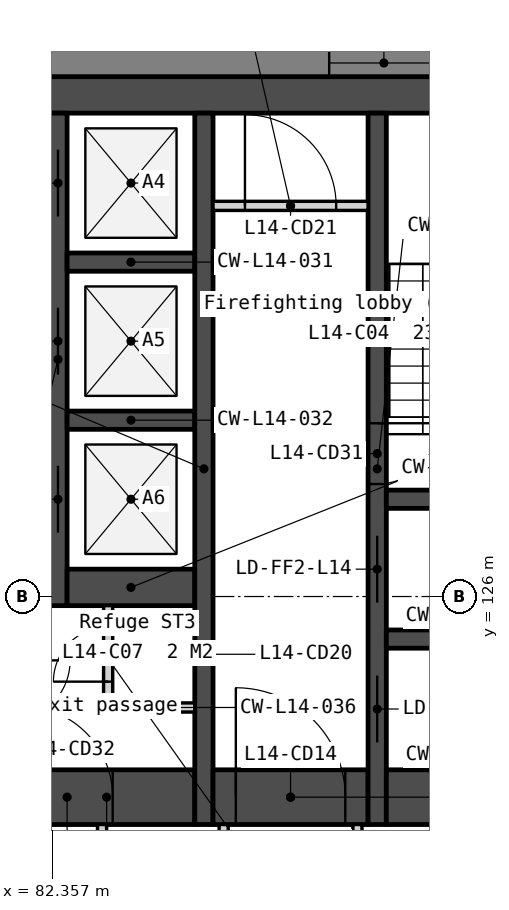
"""IFC4 building model, lengths in metres.
Left out: names, types, materials, properties, quantities, classifications, styles, units other than length and angle.
Written with IfcOpenShell. Run it as: python <this file> out.ifc"""

import sys

from ifc_helpers import new_model, si_unit, direction, frame, frame_2d, origin, place, context, subcontext, project, spatial, polyline, rectangle, outline, extrude, element, fill, save


model = new_model("IFC4")
c1 = context("Model", 3, precision=1e-05, world=origin(), true_north=direction((0.0, 1.0)))
c2 = subcontext(c1, "Body", "Model", "MODEL_VIEW")
j1 = project(units=[si_unit("LENGTHUNIT", "METRE"), si_unit("PLANEANGLEUNIT", "RADIAN")], contexts=[c1])
p1 = place(None, origin())
s1 = spatial("IfcSite", under=j1, at=p1, CompositionType="ELEMENT")
p2 = place(p1, origin())
s2 = spatial("IfcBuilding", under=s1, at=p2, CompositionType="ELEMENT")
p3 = place(p2, frame((0.0, 0.0, 63.0)))
s3 = spatial("IfcBuildingStorey", under=s2, at=p3, CompositionType="ELEMENT", Elevation=63.0)
p4 = place(p3, frame((66.0, 134.25, 0.0), z_axis=(0.0, 0.0, 1.0), x_axis=(1.0, 0.0, 0.0)))
e1 = element("IfcWall", 1, at=p4, inside=s3, PredefinedType="SOLIDWALL", context=c2, shape_type="SweptSolid", body=[
    extrude(rectangle(XDim=28.0, YDim=0.6, at=frame_2d((14.0, 0.0))), origin(), (0.0, 0.0, 1.0), 3.35),
])
p5 = place(p3, frame((81.8, 122.7, 0.0), z_axis=(0.0, 0.0, 1.0), x_axis=(1.0, 0.0, 0.0)))
e2 = element("IfcWall", 2, at=p5, inside=s3, PredefinedType="SOLIDWALL", context=c2, shape_type="SweptSolid", body=[
    extrude(rectangle(XDim=2.9, YDim=0.9, at=frame_2d((1.45, 0.0))), origin(), (0.0, 0.0, 1.0), 3.35),
])
p6 = place(p5, frame((0.05, 0.0, 0.0)))
e3 = element("IfcOpeningElement", 3, at=p6, cuts=e2, PredefinedType="OPENING", context=c2, shape_type="SweptSolid", body=[
    extrude(rectangle(XDim=1.5, YDim=2.1, at=frame_2d((0.75, 1.05))), frame((0.0, 0.46, 0.0), z_axis=(0.0, -1.0, 0.0), x_axis=(1.0, 0.0, 0.0)), (0.0, 0.0, 1.0), 0.92),
])
p7 = place(p3, frame((82.45, 133.95, 0.0), z_axis=(0.0, 0.0, 1.0), x_axis=(0.0, -1.0, 0.0)))
e4 = element("IfcWall", 4, at=p7, inside=s3, PredefinedType="SOLIDWALL", context=c2, shape_type="SweptSolid", body=[
    extrude(rectangle(XDim=8.1, YDim=0.3, at=frame_2d((4.05, 0.0))), origin(), (0.0, 0.0, 1.0), 3.35),
])
p8 = place(p7, frame((0.6, 0.0, 0.0)))
e5 = element("IfcOpeningElement", 5, at=p8, cuts=e4, PredefinedType="OPENING", context=c2, shape_type="SweptSolid", body=[
    extrude(rectangle(XDim=1.1, YDim=2.1, at=frame_2d((0.55, 1.05))), frame((0.0, 0.16, 0.0), z_axis=(0.0, -1.0, 0.0), x_axis=(1.0, 0.0, 0.0)), (0.0, 0.0, 1.0), 0.32),
])
p9 = place(p7, frame((3.2, 0.0, 0.0)))
e6 = element("IfcOpeningElement", 6, at=p9, cuts=e4, PredefinedType="OPENING", context=c2, shape_type="SweptSolid", body=[
    extrude(rectangle(XDim=1.1, YDim=2.1, at=frame_2d((0.55, 1.05))), frame((0.0, 0.16, 0.0), z_axis=(0.0, -1.0, 0.0), x_axis=(1.0, 0.0, 0.0)), (0.0, 0.0, 1.0), 0.32),
])
p10 = place(p7, frame((5.8, 0.0, 0.0)))
e7 = element("IfcOpeningElement", 7, at=p10, cuts=e4, PredefinedType="OPENING", context=c2, shape_type="SweptSolid", body=[
    extrude(rectangle(XDim=1.1, YDim=2.1, at=frame_2d((0.55, 1.05))), frame((0.0, 0.16, 0.0), z_axis=(0.0, -1.0, 0.0), x_axis=(1.0, 0.0, 0.0)), (0.0, 0.0, 1.0), 0.32),
])
for number, where, z_axis, x_axis in (
    (8, (82.6, 131.5, 0.0), (0.0, 0.0, 1.0), (1.0, 0.0, 0.0)),
    (9, (82.6, 128.9, 0.0), (0.0, 0.0, 1.0), (1.0, 0.0, 0.0)),
):
    element("IfcWall", number, at=place(p3, frame(where, z_axis=z_axis, x_axis=x_axis)), inside=s3, PredefinedType="SOLIDWALL", context=c2, shape_type="SweptSolid", body=[
        extrude(rectangle(XDim=2.1, YDim=0.3, at=frame_2d((1.05, 0.0))), origin(), (0.0, 0.0, 1.0), 3.35),
    ])
p11 = place(p3, frame((82.6, 126.15, 0.0), z_axis=(0.0, 0.0, 1.0), x_axis=(1.0, 0.0, 0.0)))
e10 = element("IfcWall", 10, at=p11, inside=s3, PredefinedType="SOLIDWALL", context=c2, shape_type="SweptSolid", body=[
    extrude(rectangle(XDim=2.1, YDim=0.6, at=frame_2d((1.05, 0.0))), origin(), (0.0, 0.0, 1.0), 3.35),
])
p12 = place(p3, frame((83.175, 122.25, 0.0), z_axis=(0.0, 0.0, 1.0), x_axis=(0.0, -1.0, 0.0)))
e11 = element("IfcWall", 11, at=p12, inside=s3, PredefinedType="PARTITIONING", context=c2, shape_type="SweptSolid", body=[
    extrude(rectangle(XDim=2.1, YDim=0.15, at=frame_2d((1.05, 0.0))), origin(), (0.0, 0.0, 1.0), 3.35),
])
p13 = place(p3, frame((83.275, 125.85, 0.0), z_axis=(0.0, 0.0, 1.0), x_axis=(0.0, -1.0, 0.0)))
e12 = element("IfcWall", 12, at=p13, inside=s3, PredefinedType="PARTITIONING", context=c2, shape_type="SweptSolid", body=[
    extrude(rectangle(XDim=1.75, YDim=0.15, at=frame_2d((0.875, 0.0))), origin(), (0.0, 0.0, 1.0), 3.35),
])
p14 = place(p13, frame((0.35, 0.0, 0.0)))
e13 = element("IfcOpeningElement", 13, at=p14, cuts=e12, PredefinedType="OPENING", context=c2, shape_type="SweptSolid", body=[
    extrude(rectangle(XDim=0.9, YDim=2.1, at=frame_2d((0.45, 1.05))), frame((0.0, 0.085, 0.0), z_axis=(0.0, -1.0, 0.0), x_axis=(1.0, 0.0, 0.0)), (0.0, 0.0, 1.0), 0.17),
])
p15 = place(p3, frame((83.35, 124.175, 0.0), z_axis=(0.0, 0.0, 1.0), x_axis=(1.0, 0.0, 0.0)))
e14 = element("IfcWall", 14, at=p15, inside=s3, PredefinedType="PARTITIONING", context=c2, shape_type="SweptSolid", body=[
    extrude(rectangle(XDim=1.35, YDim=0.15, at=frame_2d((0.675, 0.0))), origin(), (0.0, 0.0, 1.0), 3.35),
])
p16 = place(p3, frame((84.85, 133.95, 0.0), z_axis=(0.0, 0.0, 1.0), x_axis=(0.0, -1.0, 0.0)))
e15 = element("IfcWall", 15, at=p16, inside=s3, PredefinedType="SOLIDWALL", context=c2, shape_type="SweptSolid", body=[
    extrude(rectangle(XDim=11.7, YDim=0.3, at=frame_2d((5.85, 0.0))), origin(), (0.0, 0.0, 1.0), 3.35),
])
p17 = place(p3, frame((85.0, 132.425, 0.0), z_axis=(0.0, 0.0, 1.0), x_axis=(1.0, 0.0, 0.0)))
e16 = element("IfcWall", 16, at=p17, inside=s3, PredefinedType="PARTITIONING", context=c2, shape_type="SweptSolid", body=[
    extrude(rectangle(XDim=2.55, YDim=0.15, at=frame_2d((1.275, 0.0))), origin(), (0.0, 0.0, 1.0), 3.35),
])
p18 = place(p17, frame((0.525, 0.0, 0.0)))
e17 = element("IfcOpeningElement", 17, at=p18, cuts=e16, PredefinedType="OPENING", context=c2, shape_type="SweptSolid", body=[
    extrude(rectangle(XDim=1.5, YDim=2.1, at=frame_2d((0.75, 1.05))), frame((0.0, 0.085, 0.0), z_axis=(0.0, -1.0, 0.0), x_axis=(1.0, 0.0, 0.0)), (0.0, 0.0, 1.0), 0.17),
])
p19 = place(p3, frame((85.0, 122.7, 0.0), z_axis=(0.0, 0.0, 1.0), x_axis=(1.0, 0.0, 0.0)))
e18 = element("IfcWall", 18, at=p19, inside=s3, PredefinedType="SOLIDWALL", context=c2, shape_type="SweptSolid", body=[
    extrude(rectangle(XDim=2.55, YDim=0.9, at=frame_2d((1.275, 0.0))), origin(), (0.0, 0.0, 1.0), 3.35),
])
p20 = place(p19, frame((0.375, 0.0, 0.0)))
e19 = element("IfcOpeningElement", 19, at=p20, cuts=e18, PredefinedType="OPENING", context=c2, shape_type="SweptSolid", body=[
    extrude(rectangle(XDim=1.8, YDim=2.1, at=frame_2d((0.9, 1.05))), frame((0.0, 0.46, 0.0), z_axis=(0.0, -1.0, 0.0), x_axis=(1.0, 0.0, 0.0)), (0.0, 0.0, 1.0), 0.92),
])
p21 = place(p3, frame((85.175, 122.25, 0.0), z_axis=(0.0, 0.0, 1.0), x_axis=(0.0, -1.0, 0.0)))
e20 = element("IfcWall", 20, at=p21, inside=s3, PredefinedType="PARTITIONING", context=c2, shape_type="SweptSolid", body=[
    extrude(rectangle(XDim=2.1, YDim=0.15, at=frame_2d((1.05, 0.0))), origin(), (0.0, 0.0, 1.0), 3.35),
])
p22 = place(p21, frame((0.55, 0.0, 0.0)))
e21 = element("IfcOpeningElement", 21, at=p22, cuts=e20, PredefinedType="OPENING", context=c2, shape_type="SweptSolid", body=[
    extrude(rectangle(XDim=1.0, YDim=2.1, at=frame_2d((0.5, 1.05))), frame((0.0, 0.085, 0.0), z_axis=(0.0, -1.0, 0.0), x_axis=(1.0, 0.0, 0.0)), (0.0, 0.0, 1.0), 0.17),
])
p23 = place(p3, frame((87.375, 122.25, 0.0), z_axis=(0.0, 0.0, 1.0), x_axis=(0.0, -1.0, 0.0)))
e22 = element("IfcWall", 22, at=p23, inside=s3, PredefinedType="PARTITIONING", context=c2, shape_type="SweptSolid", body=[
    extrude(rectangle(XDim=2.1, YDim=0.15, at=frame_2d((1.05, 0.0))), origin(), (0.0, 0.0, 1.0), 3.35),
])
p24 = place(p3, frame((87.7, 133.95, 0.0), z_axis=(0.0, 0.0, 1.0), x_axis=(0.0, -1.0, 0.0)))
e23 = element("IfcWall", 23, at=p24, inside=s3, PredefinedType="SOLIDWALL", context=c2, shape_type="SweptSolid", body=[
    extrude(rectangle(XDim=11.7, YDim=0.3, at=frame_2d((5.85, 0.0))), origin(), (0.0, 0.0, 1.0), 3.35),
])
p25 = place(p24, frame((6.95, 0.0, 0.0)))
e24 = element("IfcOpeningElement", 24, at=p25, cuts=e23, PredefinedType="OPENING", context=c2, shape_type="SweptSolid", body=[
    extrude(rectangle(XDim=1.1, YDim=2.1, at=frame_2d((0.55, 1.05))), frame((0.0, 0.16, 0.0), z_axis=(0.0, -1.0, 0.0), x_axis=(1.0, 0.0, 0.0)), (0.0, 0.0, 1.0), 0.32),
])
p26 = place(p24, frame((5.1, 0.0, 0.0)))
e25 = element("IfcOpeningElement", 25, at=p26, cuts=e23, PredefinedType="OPENING", context=c2, shape_type="SweptSolid", body=[
    extrude(rectangle(XDim=1.0, YDim=2.1, at=frame_2d((0.5, 1.05))), frame((0.0, 0.16, 0.0), z_axis=(0.0, -1.0, 0.0), x_axis=(1.0, 0.0, 0.0)), (0.0, 0.0, 1.0), 0.32),
])
p27 = place(p24, frame((9.25, 0.0, 0.0)))
e26 = element("IfcOpeningElement", 26, at=p27, cuts=e23, PredefinedType="OPENING", context=c2, shape_type="SweptSolid", body=[
    extrude(rectangle(XDim=1.1, YDim=2.1, at=frame_2d((0.55, 1.05))), frame((0.0, 0.16, 0.0), z_axis=(0.0, -1.0, 0.0), x_axis=(1.0, 0.0, 0.0)), (0.0, 0.0, 1.0), 0.32),
])
for number, where, z_axis, x_axis in (
    (27, (87.85, 127.6, 0.0), (0.0, 0.0, 1.0), (1.0, 0.0, 0.0)),
    (28, (87.85, 125.3, 0.0), (0.0, 0.0, 1.0), (1.0, 0.0, 0.0)),
):
    element("IfcWall", number, at=place(p3, frame(where, z_axis=z_axis, x_axis=x_axis)), inside=s3, PredefinedType="SOLIDWALL", context=c2, shape_type="SweptSolid", body=[
        extrude(rectangle(XDim=2.55, YDim=0.3, at=frame_2d((1.275, 0.0))), origin(), (0.0, 0.0, 1.0), 3.35),
    ])
p28 = place(p3, frame((87.85, 122.7, 0.0), z_axis=(0.0, 0.0, 1.0), x_axis=(1.0, 0.0, 0.0)))
e29 = element("IfcWall", 29, at=p28, inside=s3, PredefinedType="SOLIDWALL", context=c2, shape_type="SweptSolid", body=[
    extrude(rectangle(XDim=2.55, YDim=0.9, at=frame_2d((1.275, 0.0))), origin(), (0.0, 0.0, 1.0), 3.35),
])
p29 = place(p3, frame((102.4, 134.775, -0.15), z_axis=(0.0, 0.0, 1.0), x_axis=(-1.0, 0.0, 0.0)))
e30 = element("IfcWall", 30, at=p29, inside=s3, PredefinedType="SOLIDWALL", context=c2, shape_type="SweptSolid", body=[
    extrude(outline(polyline([(44.8, 0.0), (44.8, 3.5), (0.0, 3.5), (0.0, 0.0), (44.8, 0.0)])), frame((0.0, 0.225, 0.0), z_axis=(0.0, -1.0, 0.0), x_axis=(1.0, 0.0, 0.0)), (0.0, 0.0, 1.0), 0.45),
])
p30 = place(p29, frame((2.43, 0.0, 1.05)))
e31 = element("IfcOpeningElement", 31, at=p30, cuts=e30, PredefinedType="OPENING", context=c2, shape_type="SweptSolid", body=[
    extrude(rectangle(XDim=1.8, YDim=1.5, at=frame_2d((0.9, 0.75))), frame((0.0, 0.235, 0.0), z_axis=(0.0, -1.0, 0.0), x_axis=(1.0, 0.0, 0.0)), (0.0, 0.0, 1.0), 0.47),
])
p31 = place(p29, frame((4.73, 0.0, 1.05)))
e32 = element("IfcOpeningElement", 32, at=p31, cuts=e30, PredefinedType="OPENING", context=c2, shape_type="SweptSolid", body=[
    extrude(rectangle(XDim=1.8, YDim=1.5, at=frame_2d((0.9, 0.75))), frame((0.0, 0.235, 0.0), z_axis=(0.0, -1.0, 0.0), x_axis=(1.0, 0.0, 0.0)), (0.0, 0.0, 1.0), 0.47),
])
p32 = place(p29, frame((11.39, 0.0, 1.05)))
e33 = element("IfcOpeningElement", 33, at=p32, cuts=e30, PredefinedType="OPENING", context=c2, shape_type="SweptSolid", body=[
    extrude(rectangle(XDim=1.8, YDim=1.5, at=frame_2d((0.9, 0.75))), frame((0.0, 0.235, 0.0), z_axis=(0.0, -1.0, 0.0), x_axis=(1.0, 0.0, 0.0)), (0.0, 0.0, 1.0), 0.47),
])
p33 = place(p29, frame((13.69, 0.0, 1.05)))
e34 = element("IfcOpeningElement", 34, at=p33, cuts=e30, PredefinedType="OPENING", context=c2, shape_type="SweptSolid", body=[
    extrude(rectangle(XDim=1.8, YDim=1.5, at=frame_2d((0.9, 0.75))), frame((0.0, 0.235, 0.0), z_axis=(0.0, -1.0, 0.0), x_axis=(1.0, 0.0, 0.0)), (0.0, 0.0, 1.0), 0.47),
])
p34 = place(p29, frame((20.35, 0.0, 1.05)))
e35 = element("IfcOpeningElement", 35, at=p34, cuts=e30, PredefinedType="OPENING", context=c2, shape_type="SweptSolid", body=[
    extrude(rectangle(XDim=1.8, YDim=1.5, at=frame_2d((0.9, 0.75))), frame((0.0, 0.235, 0.0), z_axis=(0.0, -1.0, 0.0), x_axis=(1.0, 0.0, 0.0)), (0.0, 0.0, 1.0), 0.47),
])
p35 = place(p29, frame((22.65, 0.0, 1.05)))
e36 = element("IfcOpeningElement", 36, at=p35, cuts=e30, PredefinedType="OPENING", context=c2, shape_type="SweptSolid", body=[
    extrude(rectangle(XDim=1.8, YDim=1.5, at=frame_2d((0.9, 0.75))), frame((0.0, 0.235, 0.0), z_axis=(0.0, -1.0, 0.0), x_axis=(1.0, 0.0, 0.0)), (0.0, 0.0, 1.0), 0.47),
])
p36 = place(p29, frame((29.31, 0.0, 1.05)))
e37 = element("IfcOpeningElement", 37, at=p36, cuts=e30, PredefinedType="OPENING", context=c2, shape_type="SweptSolid", body=[
    extrude(rectangle(XDim=1.8, YDim=1.5, at=frame_2d((0.9, 0.75))), frame((0.0, 0.235, 0.0), z_axis=(0.0, -1.0, 0.0), x_axis=(1.0, 0.0, 0.0)), (0.0, 0.0, 1.0), 0.47),
])
p37 = place(p29, frame((31.61, 0.0, 1.05)))
e38 = element("IfcOpeningElement", 38, at=p37, cuts=e30, PredefinedType="OPENING", context=c2, shape_type="SweptSolid", body=[
    extrude(rectangle(XDim=1.8, YDim=1.5, at=frame_2d((0.9, 0.75))), frame((0.0, 0.235, 0.0), z_axis=(0.0, -1.0, 0.0), x_axis=(1.0, 0.0, 0.0)), (0.0, 0.0, 1.0), 0.47),
])
p38 = place(p29, frame((38.27, 0.0, 1.05)))
e39 = element("IfcOpeningElement", 39, at=p38, cuts=e30, PredefinedType="OPENING", context=c2, shape_type="SweptSolid", body=[
    extrude(rectangle(XDim=1.8, YDim=1.5, at=frame_2d((0.9, 0.75))), frame((0.0, 0.235, 0.0), z_axis=(0.0, -1.0, 0.0), x_axis=(1.0, 0.0, 0.0)), (0.0, 0.0, 1.0), 0.47),
])
p39 = place(p29, frame((40.57, 0.0, 1.05)))
e40 = element("IfcOpeningElement", 40, at=p39, cuts=e30, PredefinedType="OPENING", context=c2, shape_type="SweptSolid", body=[
    extrude(rectangle(XDim=1.8, YDim=1.5, at=frame_2d((0.9, 0.75))), frame((0.0, 0.235, 0.0), z_axis=(0.0, -1.0, 0.0), x_axis=(1.0, 0.0, 0.0)), (0.0, 0.0, 1.0), 0.47),
])
p40 = place(p3, frame((83.105, 90.599, -0.15), z_axis=(0.0, 0.0, 1.0), x_axis=(0.499999201451, 0.866025864826, 0.0)))
e41 = element("IfcWall", 41, at=p40, inside=s3, PredefinedType="SOLIDWALL", context=c2, shape_type="SweptSolid", body=[
    extrude(outline(polyline([(44.8, 0.0), (44.8, 3.5), (0.0, 3.5), (0.0, 0.0), (44.8, 0.0)])), frame((0.0, 0.225, 0.0), z_axis=(0.0, -1.0, 0.0), x_axis=(1.0, 0.0, 0.0)), (0.0, 0.0, 1.0), 0.45),
])
p41 = place(p40, frame((2.43, 0.0, 1.05)))
e42 = element("IfcOpeningElement", 42, at=p41, cuts=e41, PredefinedType="OPENING", context=c2, shape_type="SweptSolid", body=[
    extrude(rectangle(XDim=1.8, YDim=1.5, at=frame_2d((0.9, 0.75))), frame((0.0, 0.235, 0.0), z_axis=(0.0, -1.0, 0.0), x_axis=(1.0, 0.0, 0.0)), (0.0, 0.0, 1.0), 0.47),
])
p42 = place(p40, frame((4.73, 0.0, 1.05)))
e43 = element("IfcOpeningElement", 43, at=p42, cuts=e41, PredefinedType="OPENING", context=c2, shape_type="SweptSolid", body=[
    extrude(rectangle(XDim=1.8, YDim=1.5, at=frame_2d((0.9, 0.75))), frame((0.0, 0.235, 0.0), z_axis=(0.0, -1.0, 0.0), x_axis=(1.0, 0.0, 0.0)), (0.0, 0.0, 1.0), 0.47),
])
p43 = place(p40, frame((11.39, 0.0, 1.05)))
e44 = element("IfcOpeningElement", 44, at=p43, cuts=e41, PredefinedType="OPENING", context=c2, shape_type="SweptSolid", body=[
    extrude(rectangle(XDim=1.8, YDim=1.5, at=frame_2d((0.9, 0.75))), frame((0.0, 0.235, 0.0), z_axis=(0.0, -1.0, 0.0), x_axis=(1.0, 0.0, 0.0)), (0.0, 0.0, 1.0), 0.47),
])
p44 = place(p40, frame((13.69, 0.0, 1.05)))
e45 = element("IfcOpeningElement", 45, at=p44, cuts=e41, PredefinedType="OPENING", context=c2, shape_type="SweptSolid", body=[
    extrude(rectangle(XDim=1.8, YDim=1.5, at=frame_2d((0.9, 0.75))), frame((0.0, 0.235, 0.0), z_axis=(0.0, -1.0, 0.0), x_axis=(1.0, 0.0, 0.0)), (0.0, 0.0, 1.0), 0.47),
])
p45 = place(p40, frame((20.35, 0.0, 1.05)))
e46 = element("IfcOpeningElement", 46, at=p45, cuts=e41, PredefinedType="OPENING", context=c2, shape_type="SweptSolid", body=[
    extrude(rectangle(XDim=1.8, YDim=1.5, at=frame_2d((0.9, 0.75))), frame((0.0, 0.235, 0.0), z_axis=(0.0, -1.0, 0.0), x_axis=(1.0, 0.0, 0.0)), (0.0, 0.0, 1.0), 0.47),
])
p46 = place(p40, frame((22.65, 0.0, 1.05)))
e47 = element("IfcOpeningElement", 47, at=p46, cuts=e41, PredefinedType="OPENING", context=c2, shape_type="SweptSolid", body=[
    extrude(rectangle(XDim=1.8, YDim=1.5, at=frame_2d((0.9, 0.75))), frame((0.0, 0.235, 0.0), z_axis=(0.0, -1.0, 0.0), x_axis=(1.0, 0.0, 0.0)), (0.0, 0.0, 1.0), 0.47),
])
p47 = place(p40, frame((29.31, 0.0, 1.05)))
e48 = element("IfcOpeningElement", 48, at=p47, cuts=e41, PredefinedType="OPENING", context=c2, shape_type="SweptSolid", body=[
    extrude(rectangle(XDim=1.8, YDim=1.5, at=frame_2d((0.9, 0.75))), frame((0.0, 0.235, 0.0), z_axis=(0.0, -1.0, 0.0), x_axis=(1.0, 0.0, 0.0)), (0.0, 0.0, 1.0), 0.47),
])
p48 = place(p40, frame((31.61, 0.0, 1.05)))
e49 = element("IfcOpeningElement", 49, at=p48, cuts=e41, PredefinedType="OPENING", context=c2, shape_type="SweptSolid", body=[
    extrude(rectangle(XDim=1.8, YDim=1.5, at=frame_2d((0.9, 0.75))), frame((0.0, 0.235, 0.0), z_axis=(0.0, -1.0, 0.0), x_axis=(1.0, 0.0, 0.0)), (0.0, 0.0, 1.0), 0.47),
])
p49 = place(p40, frame((38.27, 0.0, 1.05)))
e50 = element("IfcOpeningElement", 50, at=p49, cuts=e41, PredefinedType="OPENING", context=c2, shape_type="SweptSolid", body=[
    extrude(rectangle(XDim=1.8, YDim=1.5, at=frame_2d((0.9, 0.75))), frame((0.0, 0.235, 0.0), z_axis=(0.0, -1.0, 0.0), x_axis=(1.0, 0.0, 0.0)), (0.0, 0.0, 1.0), 0.47),
])
p50 = place(p40, frame((40.57, 0.0, 1.05)))
e51 = element("IfcOpeningElement", 51, at=p50, cuts=e41, PredefinedType="OPENING", context=c2, shape_type="SweptSolid", body=[
    extrude(rectangle(XDim=1.8, YDim=1.5, at=frame_2d((0.9, 0.75))), frame((0.0, 0.235, 0.0), z_axis=(0.0, -1.0, 0.0), x_axis=(1.0, 0.0, 0.0)), (0.0, 0.0, 1.0), 0.47),
])
p51 = place(p8, origin())
e52 = element("IfcDoor", 52, at=p51, inside=s3, OperationType="SLIDING_TO_LEFT", PredefinedType="DOOR", context=c2, shape_type="SweptSolid", body=[
    extrude(rectangle(XDim=1.1, YDim=2.1, at=frame_2d((0.55, 1.05))), frame((0.0, 0.025, 0.0), z_axis=(0.0, -1.0, 0.0), x_axis=(1.0, 0.0, 0.0)), (0.0, 0.0, 1.0), 0.05),
])
fill(e5, e52)
p52 = place(p9, origin())
e53 = element("IfcDoor", 53, at=p52, inside=s3, OperationType="SLIDING_TO_LEFT", PredefinedType="DOOR", context=c2, shape_type="SweptSolid", body=[
    extrude(rectangle(XDim=1.1, YDim=2.1, at=frame_2d((0.55, 1.05))), frame((0.0, 0.025, 0.0), z_axis=(0.0, -1.0, 0.0), x_axis=(1.0, 0.0, 0.0)), (0.0, 0.0, 1.0), 0.05),
])
fill(e6, e53)
p53 = place(p10, origin())
e54 = element("IfcDoor", 54, at=p53, inside=s3, OperationType="SLIDING_TO_LEFT", PredefinedType="DOOR", context=c2, shape_type="SweptSolid", body=[
    extrude(rectangle(XDim=1.1, YDim=2.1, at=frame_2d((0.55, 1.05))), frame((0.0, 0.025, 0.0), z_axis=(0.0, -1.0, 0.0), x_axis=(1.0, 0.0, 0.0)), (0.0, 0.0, 1.0), 0.05),
])
fill(e7, e54)
p54 = place(p25, origin())
e55 = element("IfcDoor", 55, at=p54, inside=s3, OperationType="SLIDING_TO_LEFT", PredefinedType="DOOR", context=c2, shape_type="SweptSolid", body=[
    extrude(rectangle(XDim=1.1, YDim=2.1, at=frame_2d((0.55, 1.05))), frame((0.0, 0.025, 0.0), z_axis=(0.0, -1.0, 0.0), x_axis=(1.0, 0.0, 0.0)), (0.0, 0.0, 1.0), 0.05),
])
fill(e24, e55)
p55 = place(p20, origin())
e56 = element("IfcDoor", 56, at=p55, inside=s3, OperationType="DOUBLE_DOOR_DOUBLE_SWING", PredefinedType="DOOR", context=c2, shape_type="SweptSolid", body=[
    extrude(rectangle(XDim=1.8, YDim=2.1, at=frame_2d((0.9, 1.05))), frame((0.0, 0.025, 0.0), z_axis=(0.0, -1.0, 0.0), x_axis=(1.0, 0.0, 0.0)), (0.0, 0.0, 1.0), 0.05),
])
fill(e19, e56)
p56 = place(p6, origin())
e57 = element("IfcDoor", 57, at=p56, inside=s3, OperationType="DOUBLE_DOOR_DOUBLE_SWING", PredefinedType="DOOR", context=c2, shape_type="SweptSolid", body=[
    extrude(rectangle(XDim=1.5, YDim=2.1, at=frame_2d((0.75, 1.05))), frame((0.0, 0.025, 0.0), z_axis=(0.0, -1.0, 0.0), x_axis=(1.0, 0.0, 0.0)), (0.0, 0.0, 1.0), 0.05),
])
fill(e3, e57)
p57 = place(p14, origin())
e58 = element("IfcDoor", 58, at=p57, inside=s3, OperationType="SINGLE_SWING_RIGHT", PredefinedType="DOOR", context=c2, shape_type="SweptSolid", body=[
    extrude(rectangle(XDim=0.9, YDim=2.1, at=frame_2d((0.45, 1.05))), frame((0.0, 0.025, 0.0), z_axis=(0.0, -1.0, 0.0), x_axis=(1.0, 0.0, 0.0)), (0.0, 0.0, 1.0), 0.05),
])
fill(e13, e58)
p58 = place(p18, origin())
e59 = element("IfcDoor", 59, at=p58, inside=s3, OperationType="DOUBLE_DOOR_DOUBLE_SWING", PredefinedType="DOOR", context=c2, shape_type="SweptSolid", body=[
    extrude(rectangle(XDim=1.5, YDim=2.1, at=frame_2d((0.75, 1.05))), frame((0.0, 0.025, 0.0), z_axis=(0.0, -1.0, 0.0), x_axis=(1.0, 0.0, 0.0)), (0.0, 0.0, 1.0), 0.05),
])
fill(e17, e59)
p59 = place(p26, origin())
e60 = element("IfcDoor", 60, at=p59, inside=s3, OperationType="SINGLE_SWING_LEFT", PredefinedType="DOOR", context=c2, shape_type="SweptSolid", body=[
    extrude(rectangle(XDim=1.0, YDim=2.1, at=frame_2d((0.5, 1.05))), frame((0.0, 0.025, 0.0), z_axis=(0.0, -1.0, 0.0), x_axis=(1.0, 0.0, 0.0)), (0.0, 0.0, 1.0), 0.05),
])
fill(e25, e60)
p60 = place(p27, origin())
e61 = element("IfcDoor", 61, at=p60, inside=s3, OperationType="SLIDING_TO_LEFT", PredefinedType="DOOR", context=c2, shape_type="SweptSolid", body=[
    extrude(rectangle(XDim=1.1, YDim=2.1, at=frame_2d((0.55, 1.05))), frame((0.0, 0.025, 0.0), z_axis=(0.0, -1.0, 0.0), x_axis=(1.0, 0.0, 0.0)), (0.0, 0.0, 1.0), 0.05),
])
fill(e26, e61)
p61 = place(p33, origin())
e62 = element("IfcWindow", 62, at=p61, inside=s3, PartitioningType="SINGLE_PANEL", PredefinedType="WINDOW", context=c2, shape_type="SweptSolid", body=[
    extrude(rectangle(XDim=1.8, YDim=1.5, at=frame_2d((0.9, 0.75))), frame((0.0, 0.03, 0.0), z_axis=(0.0, -1.0, 0.0), x_axis=(1.0, 0.0, 0.0)), (0.0, 0.0, 1.0), 0.06),
])
fill(e34, e62)
save(model, sys.argv[1])
